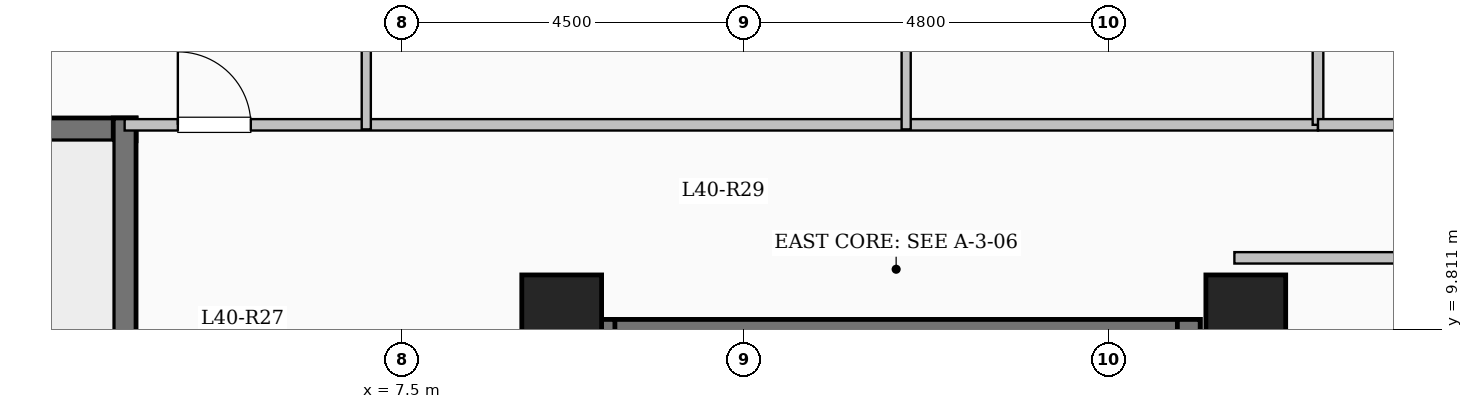
"""IFC4 building model, lengths in metres.
Left out: names, types, materials, properties, quantities, classifications, styles, units other than length and angle.
Written with IfcOpenShell. Run it as: python <this file> out.ifc"""

import sys

from ifc_helpers import new_model, si_unit, direction, frame, frame_2d, origin, origin_2d, place, context, subcontext, project, spatial, rectangle, extrude, element, fill, save


model = new_model("IFC4")
c1 = context("Model", 3, precision=1e-05, world=origin(), true_north=direction((0.0, 1.0)))
c2 = subcontext(c1, "Body", "Model", "MODEL_VIEW")
j1 = project(units=[si_unit("LENGTHUNIT", "METRE"), si_unit("PLANEANGLEUNIT", "RADIAN")], contexts=[c1])
p1 = place(None, origin())
s1 = spatial("IfcSite", under=j1, at=p1, CompositionType="ELEMENT")
p2 = place(p1, origin())
s2 = spatial("IfcBuilding", under=s1, at=p2, CompositionType="ELEMENT")
p3 = place(p2, frame((0.0, 0.0, 149.35)))
s3 = spatial("IfcBuildingStorey", under=s2, at=p3, CompositionType="ELEMENT", Elevation=149.35)
for number, where, z_axis, x_axis in (
    (1, (9.6, 10.0, 0.0), (0.0, 0.0, 1.0), (1.0, 0.0, 0.0)),
    (2, (18.6, 10.0, 0.0), (0.0, 0.0, 1.0), (1.0, 0.0, 0.0)),
):
    element("IfcColumn", number, at=place(p3, frame(where, z_axis=z_axis, x_axis=x_axis)), inside=s3, PredefinedType="COLUMN", context=c2, shape_type="SweptSolid", body=[
        extrude(rectangle(XDim=1.05, YDim=1.05, at=origin_2d()), origin(), (0.0, 0.0, 1.0), 3.35),
    ])
p4 = place(p3, frame((10.0, 9.79, 0.0), z_axis=(0.0, 0.0, 1.0), x_axis=(1.0, 0.0, 0.0)))
e3 = element("IfcWall", 3, at=p4, inside=s3, PredefinedType="SHEAR", context=c2, shape_type="SweptSolid", body=[
    extrude(rectangle(XDim=8.0, YDim=0.3, at=frame_2d((4.0, 0.0))), origin(), (0.0, 0.0, 1.0), 3.35),
])
for number, where, z_axis, x_axis in (
    (4, (10.15, 6.35, 0.0), (0.0, 0.0, 1.0), (0.0, 1.0, 0.0)),
    (5, (17.85, 6.35, 0.0), (0.0, 0.0, 1.0), (0.0, 1.0, 0.0)),
):
    element("IfcWall", number, at=place(p3, frame(where, z_axis=z_axis, x_axis=x_axis)), inside=s3, PredefinedType="SHEAR", context=c2, shape_type="SweptSolid", body=[
        extrude(rectangle(XDim=3.59, YDim=0.3, at=frame_2d((1.795, 0.0))), origin(), (0.0, 0.0, 1.0), 3.35),
    ])
p5 = place(p3, frame((-4.0, 12.44, 0.0), z_axis=(0.0, 0.0, 1.0), x_axis=(1.0, 0.0, 0.0)))
e6 = element("IfcWall", 6, at=p5, inside=s3, PredefinedType="SHEAR", context=c2, shape_type="SweptSolid", body=[
    extrude(rectangle(XDim=8.0, YDim=0.3, at=frame_2d((4.0, 0.0))), origin(), (0.0, 0.0, 1.0), 3.35),
])
p6 = place(p3, frame((3.85, 9.0, 0.0), z_axis=(0.0, 0.0, 1.0), x_axis=(0.0, 1.0, 0.0)))
e7 = element("IfcWall", 7, at=p6, inside=s3, PredefinedType="SHEAR", context=c2, shape_type="SweptSolid", body=[
    extrude(rectangle(XDim=3.59, YDim=0.3, at=frame_2d((1.795, 0.0))), origin(), (0.0, 0.0, 1.0), 3.35),
])
p7 = place(p3, frame((3.85, 12.5, 0.0), z_axis=(0.0, 0.0, 1.0), x_axis=(1.0, 0.0, 0.0)))
e8 = element("IfcWall", 8, at=p7, inside=s3, PredefinedType="PARTITIONING", context=c2, shape_type="SweptSolid", body=[
    extrude(rectangle(XDim=15.7, YDim=0.15, at=frame_2d((7.85, 0.0))), origin(), (0.0, 0.0, 1.0), 3.1),
])
p8 = place(p7, frame((0.7, 0.0, 0.0)))
e9 = element("IfcOpeningElement", 9, at=p8, cuts=e8, PredefinedType="OPENING", context=c2, shape_type="SweptSolid", body=[
    extrude(rectangle(XDim=0.96, YDim=2.15, at=frame_2d((0.48, 1.075))), frame((0.0, 0.085, 0.0), z_axis=(0.0, -1.0, 0.0), x_axis=(1.0, 0.0, 0.0)), (0.0, 0.0, 1.0), 0.17),
])
p9 = place(p3, frame((7.029, 12.44, 0.0), z_axis=(0.0, 0.0, 1.0), x_axis=(0.0, 1.0, 0.0)))
e10 = element("IfcWall", 10, at=p9, inside=s3, PredefinedType="PARTITIONING", context=c2, shape_type="SweptSolid", body=[
    extrude(rectangle(XDim=9.74, YDim=0.12, at=frame_2d((4.87, 0.0))), origin(), (0.0, 0.0, 1.0), 3.1),
])
p10 = place(p9, frame((3.075, 0.0, 0.0)))
e11 = element("IfcOpeningElement", 11, at=p10, cuts=e10, PredefinedType="OPENING", context=c2, shape_type="SweptSolid", body=[
    extrude(rectangle(XDim=1.08, YDim=2.15, at=frame_2d((0.54, 1.075))), frame((0.0, 0.07, 0.0), z_axis=(0.0, -1.0, 0.0), x_axis=(1.0, 0.0, 0.0)), (0.0, 0.0, 1.0), 0.14),
])
p11 = place(p3, frame((14.132, 12.44, 0.0), z_axis=(0.0, 0.0, 1.0), x_axis=(0.0, 1.0, 0.0)))
e12 = element("IfcWall", 12, at=p11, inside=s3, PredefinedType="PARTITIONING", context=c2, shape_type="SweptSolid", body=[
    extrude(rectangle(XDim=2.79, YDim=0.12, at=frame_2d((1.395, 0.0))), origin(), (0.0, 0.0, 1.0), 3.1),
])
p12 = place(p3, frame((18.45, 10.75, 0.0), z_axis=(0.0, 0.0, 1.0), x_axis=(1.0, 0.0, 0.0)))
e13 = element("IfcWall", 13, at=p12, inside=s3, PredefinedType="PARTITIONING", context=c2, shape_type="SweptSolid", body=[
    extrude(rectangle(XDim=6.63, YDim=0.15, at=frame_2d((3.315, 0.0))), origin(), (0.0, 0.0, 1.0), 3.1),
])
p13 = place(p3, frame((19.55, 12.5, 0.0), z_axis=(0.0, 0.0, 1.0), x_axis=(0.0, 1.0, 0.0)))
e14 = element("IfcWall", 14, at=p13, inside=s3, PredefinedType="PARTITIONING", context=c2, shape_type="SweptSolid", body=[
    extrude(rectangle(XDim=4.75, YDim=0.14, at=frame_2d((2.375, 0.0))), origin(), (0.0, 0.0, 1.0), 3.1),
])
p14 = place(p3, frame((19.55, 12.5, 0.0), z_axis=(0.0, 0.0, 1.0), x_axis=(1.0, 0.0, 0.0)))
e15 = element("IfcWall", 15, at=p14, inside=s3, PredefinedType="PARTITIONING", context=c2, shape_type="SweptSolid", body=[
    extrude(rectangle(XDim=5.53, YDim=0.15, at=frame_2d((2.765, 0.0))), origin(), (0.0, 0.0, 1.0), 3.1),
])
p15 = place(p14, frame((2.29, 0.0, 0.0)))
e16 = element("IfcOpeningElement", 16, at=p15, cuts=e15, PredefinedType="OPENING", context=c2, shape_type="SweptSolid", body=[
    extrude(rectangle(XDim=0.95, YDim=2.15, at=frame_2d((0.475, 1.075))), frame((0.0, 0.085, 0.0), z_axis=(0.0, -1.0, 0.0), x_axis=(1.0, 0.0, 0.0)), (0.0, 0.0, 1.0), 0.17),
])
p16 = place(p8, origin())
e17 = element("IfcDoor", 17, at=p16, inside=s3, OperationType="SINGLE_SWING_LEFT", PredefinedType="DOOR", context=c2, shape_type="SweptSolid", body=[
    extrude(rectangle(XDim=0.96, YDim=2.15, at=frame_2d((0.48, 1.075))), frame((0.0, 0.025, 0.0), z_axis=(0.0, -1.0, 0.0), x_axis=(1.0, 0.0, 0.0)), (0.0, 0.0, 1.0), 0.05),
])
fill(e9, e17)
save(model, sys.argv[1])
